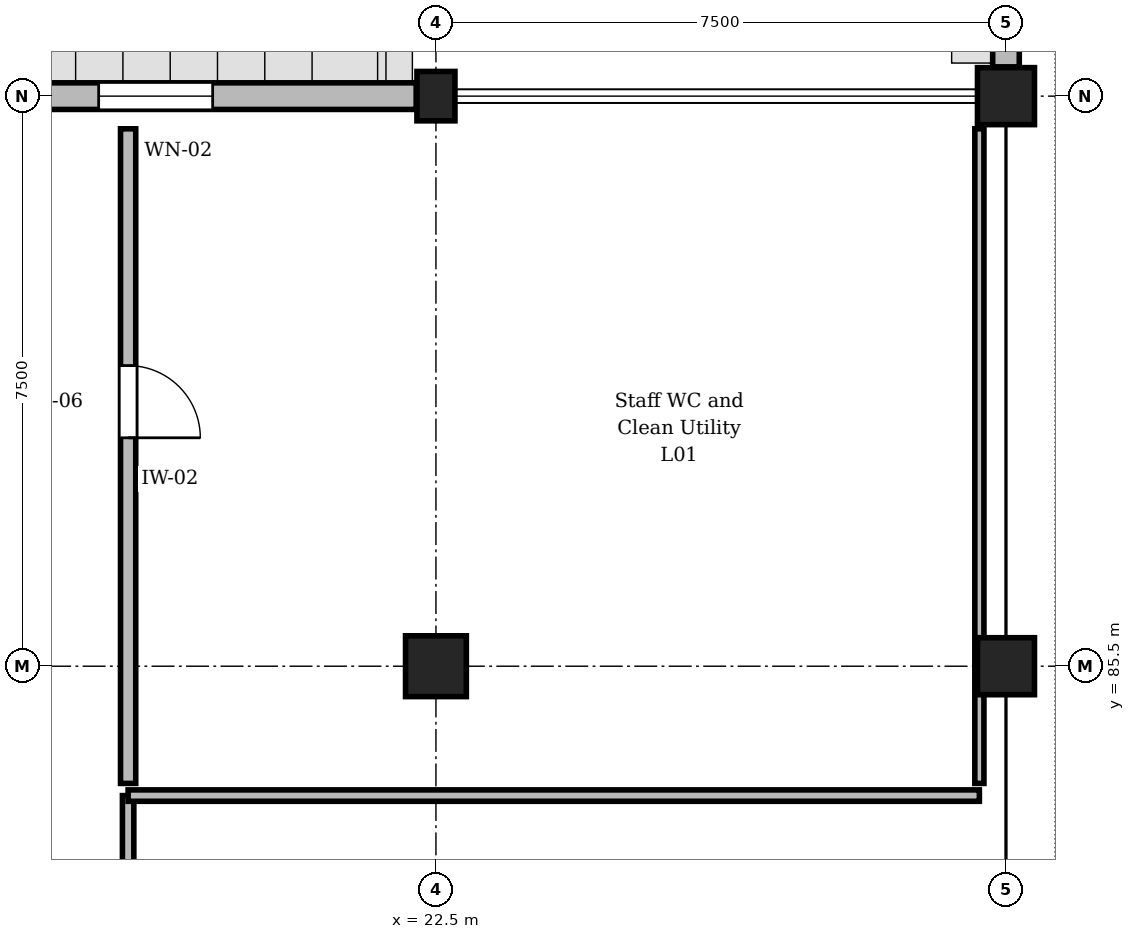
"""IFC4 building model, lengths in metres.
Left out: names, types, materials, properties, quantities, classifications, styles, units other than length and angle.
Written with IfcOpenShell. Run it as: python <this file> out.ifc"""

import sys

from ifc_helpers import new_model, si_unit, direction, frame, frame_2d, origin, origin_2d, place, context, subcontext, project, spatial, rectangle, circle, extrude, element, fill, save


model = new_model("IFC4")
c1 = context("Model", 3, precision=1e-05, world=origin(), true_north=direction((0.0, 1.0)))
c2 = subcontext(c1, "Body", "Model", "MODEL_VIEW")
j1 = project(units=[si_unit("LENGTHUNIT", "METRE"), si_unit("PLANEANGLEUNIT", "RADIAN")], contexts=[c1])
p1 = place(None, origin())
s1 = spatial("IfcSite", under=j1, at=p1, CompositionType="ELEMENT")
p2 = place(p1, origin())
s2 = spatial("IfcBuilding", under=s1, at=p2, CompositionType="ELEMENT")
p3 = place(p2, frame((0.0, 0.0, 4.8)))
s3 = spatial("IfcBuildingStorey", under=s2, at=p3, CompositionType="ELEMENT", Elevation=4.8)
p4 = place(p3, frame((22.5, 85.5, 0.0), z_axis=(0.0, 0.0, 1.0), x_axis=(1.0, 0.0, 0.0)))
e1 = element("IfcColumn", 1, at=p4, inside=s3, PredefinedType="COLUMN", context=c2, shape_type="SweptSolid", body=[
    extrude(rectangle(XDim=0.8, YDim=0.8, at=origin_2d()), origin(), (0.0, 0.0, 1.0), 4.5),
])
p5 = place(p3, frame((22.5, 93.0, 0.0), z_axis=(0.0, 0.0, 1.0), x_axis=(1.0, 0.0, 0.0)))
e2 = element("IfcColumn", 2, at=p5, inside=s3, PredefinedType="COLUMN", context=c2, shape_type="SweptSolid", body=[
    extrude(rectangle(XDim=0.5, YDim=0.65, at=origin_2d()), origin(), (0.0, 0.0, 1.0), 4.5),
])
p6 = place(p3, frame((30.0, 85.5, 0.0), z_axis=(0.0, 0.0, 1.0), x_axis=(1.0, 0.0, 0.0)))
e3 = element("IfcColumn", 3, at=p6, inside=s3, PredefinedType="COLUMN", context=c2, shape_type="SweptSolid", body=[
    extrude(circle(Radius=0.375, at=origin_2d()), origin(), (0.0, 0.0, 1.0), 4.5),
])
p7 = place(p3, frame((30.0, 93.0, 0.0), z_axis=(0.0, 0.0, 1.0), x_axis=(1.0, 0.0, 0.0)))
e4 = element("IfcColumn", 4, at=p7, inside=s3, PredefinedType="COLUMN", context=c2, shape_type="SweptSolid", body=[
    extrude(rectangle(XDim=0.75, YDim=0.75, at=origin_2d()), origin(), (0.0, 0.0, 1.0), 4.5),
])
p8 = place(p3, frame((15.385, 93.0, 0.0), z_axis=(0.0, 0.0, 1.0), x_axis=(1.0, 0.0, 0.0)))
e5 = element("IfcWall", 5, at=p8, inside=s3, PredefinedType="STANDARD", context=c2, shape_type="SweptSolid", body=[
    extrude(rectangle(XDim=6.855, YDim=0.35, at=frame_2d((3.427, 0.0))), origin(), (0.0, 0.0, 1.0), 3.63),
])
p9 = place(p8, frame((2.677, 0.0, 0.9)))
e6 = element("IfcOpeningElement", 6, at=p9, cuts=e5, PredefinedType="OPENING", context=c2, shape_type="SweptSolid", body=[
    extrude(rectangle(XDim=1.5, YDim=2.4, at=frame_2d((0.75, 1.2))), frame((0.0, 0.185, 0.0), z_axis=(0.0, -1.0, 0.0), x_axis=(1.0, 0.0, 0.0)), (0.0, 0.0, 1.0), 0.37),
])
p10 = place(p3, frame((30.0, 93.385, 0.0), z_axis=(0.0, 0.0, 1.0), x_axis=(0.0, 1.0, 0.0)))
e7 = element("IfcWall", 7, at=p10, inside=s3, PredefinedType="STANDARD", context=c2, shape_type="SweptSolid", body=[
    extrude(rectangle(XDim=6.805, YDim=0.35, at=frame_2d((3.402, 0.0))), origin(), (0.0, 0.0, 1.0), 3.63),
])
p11 = place(p10, frame((2.202, 0.0, 0.9)))
e8 = element("IfcOpeningElement", 8, at=p11, cuts=e7, PredefinedType="OPENING", context=c2, shape_type="SweptSolid", body=[
    extrude(rectangle(XDim=2.4, YDim=2.45, at=frame_2d((1.2, 1.225))), frame((0.0, 0.185, 0.0), z_axis=(0.0, -1.0, 0.0), x_axis=(1.0, 0.0, 0.0)), (0.0, 0.0, 1.0), 0.37),
])
p12 = place(p3, frame((18.45, 83.798, 0.0), z_axis=(0.0, 0.0, 1.0), x_axis=(0.0, -1.0, 0.0)))
e9 = element("IfcWall", 9, at=p12, inside=s3, PredefinedType="PARTITIONING", context=c2, shape_type="SweptSolid", body=[
    extrude(rectangle(XDim=8.612, YDim=0.15, at=frame_2d((4.306, 0.0))), origin(), (0.0, 0.0, 1.0), 3.765),
])
p13 = place(p12, frame((2.279, 0.0, 0.0)))
e10 = element("IfcOpeningElement", 10, at=p13, cuts=e9, PredefinedType="OPENING", context=c2, shape_type="SweptSolid", body=[
    extrude(rectangle(XDim=1.35, YDim=2.25, at=frame_2d((0.675, 1.125))), frame((0.0, 0.085, 0.0), z_axis=(0.0, -1.0, 0.0), x_axis=(1.0, 0.0, 0.0)), (0.0, 0.0, 1.0), 0.17),
])
p14 = place(p3, frame((18.45, 92.57, 0.0), z_axis=(0.0, 0.0, 1.0), x_axis=(0.0, -1.0, 0.0)))
e11 = element("IfcWall", 11, at=p14, inside=s3, PredefinedType="STANDARD", context=c2, shape_type="SweptSolid", body=[
    extrude(rectangle(XDim=8.612, YDim=0.2, at=frame_2d((4.306, 0.0))), origin(), (0.0, 0.0, 1.0), 3.765),
])
p15 = place(p14, frame((3.115, 0.0, 0.0)))
e12 = element("IfcOpeningElement", 12, at=p15, cuts=e11, PredefinedType="OPENING", context=c2, shape_type="SweptSolid", body=[
    extrude(rectangle(XDim=0.95, YDim=2.15, at=frame_2d((0.475, 1.075))), frame((0.0, 0.11, 0.0), z_axis=(0.0, -1.0, 0.0), x_axis=(1.0, 0.0, 0.0)), (0.0, 0.0, 1.0), 0.22),
])
p16 = place(p3, frame((18.45, 83.798, 0.0), z_axis=(0.0, 0.0, 1.0), x_axis=(1.0, 0.0, 0.0)))
e13 = element("IfcWall", 13, at=p16, inside=s3, PredefinedType="PARTITIONING", context=c2, shape_type="SweptSolid", body=[
    extrude(rectangle(XDim=11.2, YDim=0.15, at=frame_2d((5.6, 0.0))), origin(), (0.0, 0.0, 1.0), 4.165),
])
p17 = place(p3, frame((29.65, 83.958, 0.0), z_axis=(0.0, 0.0, 1.0), x_axis=(0.0, 1.0, 0.0)))
e14 = element("IfcWall", 14, at=p17, inside=s3, PredefinedType="PARTITIONING", context=c2, shape_type="SweptSolid", body=[
    extrude(rectangle(XDim=8.612, YDim=0.12, at=frame_2d((4.306, 0.0))), origin(), (0.0, 0.0, 1.0), 3.465),
])
p18 = place(p9, origin())
e15 = element("IfcWindow", 15, at=p18, inside=s3, PartitioningType="SINGLE_PANEL", PredefinedType="WINDOW", context=c2, shape_type="SweptSolid", body=[
    extrude(rectangle(XDim=1.5, YDim=2.4, at=frame_2d((0.75, 1.2))), frame((0.0, 0.03, 0.0), z_axis=(0.0, -1.0, 0.0), x_axis=(1.0, 0.0, 0.0)), (0.0, 0.0, 1.0), 0.06),
])
fill(e6, e15)
p19 = place(p15, origin())
e16 = element("IfcDoor", 16, at=p19, inside=s3, OperationType="SINGLE_SWING_RIGHT", PredefinedType="DOOR", context=c2, shape_type="SweptSolid", body=[
    extrude(rectangle(XDim=0.95, YDim=2.15, at=frame_2d((0.475, 1.075))), frame((0.0, 0.025, 0.0), z_axis=(0.0, -1.0, 0.0), x_axis=(1.0, 0.0, 0.0)), (0.0, 0.0, 1.0), 0.05),
])
fill(e12, e16)
save(model, sys.argv[1])
